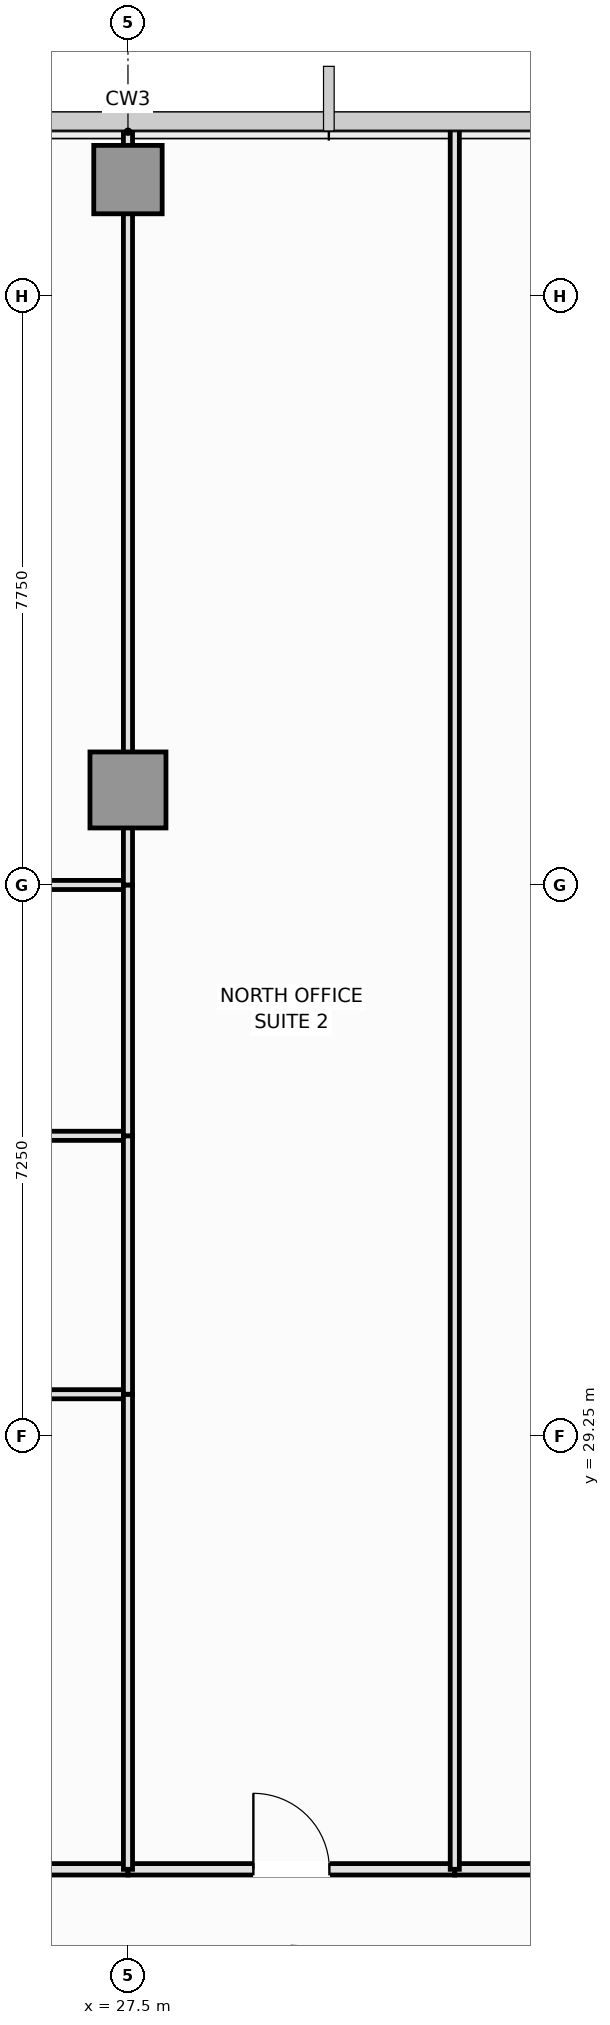
"""IFC4 building model, lengths in metres.
Left out: names, types, materials, properties, quantities, classifications, styles, units other than length and angle.
Written with IfcOpenShell. Run it as: python <this file> out.ifc"""

import sys

from ifc_helpers import new_model, si_unit, direction, frame, frame_2d, origin, origin_2d, place, context, subcontext, project, spatial, rectangle, extrude, element, fill, save


model = new_model("IFC4")
c1 = context("Model", 3, precision=1e-05, world=origin(), true_north=direction((0.0, 1.0)))
c2 = subcontext(c1, "Body", "Model", "MODEL_VIEW")
j1 = project(units=[si_unit("LENGTHUNIT", "METRE"), si_unit("PLANEANGLEUNIT", "RADIAN")], contexts=[c1])
p1 = place(None, origin())
s1 = spatial("IfcSite", under=j1, at=p1, CompositionType="ELEMENT")
p2 = place(p1, origin())
s2 = spatial("IfcBuilding", under=s1, at=p2, CompositionType="ELEMENT")
p3 = place(p2, frame((0.0, 0.0, 127.1)))
s3 = spatial("IfcBuildingStorey", under=s2, at=p3, CompositionType="ELEMENT", Elevation=127.1)
p4 = place(p3, frame((27.5, 37.75, 0.0), z_axis=(0.0, 0.0, 1.0), x_axis=(1.0, 0.0, 0.0)))
e1 = element("IfcColumn", 1, at=p4, inside=s3, PredefinedType="COLUMN", context=c2, shape_type="SweptSolid", body=[
    extrude(rectangle(XDim=1.0, YDim=1.0, at=origin_2d()), origin(), (0.0, 0.0, 1.0), 3.55),
])
p5 = place(p3, frame((27.5, 45.78, 0.0), z_axis=(0.0, 0.0, 1.0), x_axis=(1.0, 0.0, 0.0)))
e2 = element("IfcColumn", 2, at=p5, inside=s3, PredefinedType="COLUMN", context=c2, shape_type="SweptSolid", body=[
    extrude(rectangle(XDim=0.9, YDim=0.9, at=origin_2d()), origin(), (0.0, 0.0, 1.0), 3.55),
])
p6 = place(p3, frame((19.95, 23.55, 0.0), z_axis=(0.0, 0.0, 1.0), x_axis=(1.0, 0.0, 0.0)))
e3 = element("IfcWall", 3, at=p6, inside=s3, PredefinedType="PARTITIONING", context=c2, shape_type="SweptSolid", body=[
    extrude(rectangle(XDim=7.55, YDim=0.15, at=frame_2d((3.775, 0.0))), origin(), (0.0, 0.0, 1.0), 3.37),
])
p7 = place(p3, frame((27.5, 23.55, 0.0), z_axis=(0.0, 0.0, 1.0), x_axis=(1.0, 0.0, 0.0)))
e4 = element("IfcWall", 4, at=p7, inside=s3, PredefinedType="PARTITIONING", context=c2, shape_type="SweptSolid", body=[
    extrude(rectangle(XDim=4.3, YDim=0.15, at=frame_2d((2.15, 0.0))), origin(), (0.0, 0.0, 1.0), 3.37),
])
p8 = place(p7, frame((1.65, 0.0, 0.0)))
e5 = element("IfcOpeningElement", 5, at=p8, cuts=e4, PredefinedType="OPENING", context=c2, shape_type="SweptSolid", body=[
    extrude(rectangle(XDim=1.0, YDim=2.15, at=frame_2d((0.5, 1.075))), frame((0.0, 0.085, 0.0), z_axis=(0.0, -1.0, 0.0), x_axis=(1.0, 0.0, 0.0)), (0.0, 0.0, 1.0), 0.17),
])
p9 = place(p3, frame((31.8, 23.55, 0.0), z_axis=(0.0, 0.0, 1.0), x_axis=(1.0, 0.0, 0.0)))
e6 = element("IfcWall", 6, at=p9, inside=s3, PredefinedType="PARTITIONING", context=c2, shape_type="SweptSolid", body=[
    extrude(rectangle(XDim=4.4, YDim=0.15, at=frame_2d((2.2, 0.0))), origin(), (0.0, 0.0, 1.0), 3.37),
])
p10 = place(p9, frame((1.7, 0.0, 0.0)))
e7 = element("IfcOpeningElement", 7, at=p10, cuts=e6, PredefinedType="OPENING", context=c2, shape_type="SweptSolid", body=[
    extrude(rectangle(XDim=1.0, YDim=2.15, at=frame_2d((0.5, 1.075))), frame((0.0, 0.085, 0.0), z_axis=(0.0, -1.0, 0.0), x_axis=(1.0, 0.0, 0.0)), (0.0, 0.0, 1.0), 0.17),
])
p11 = place(p3, frame((19.95, 29.8, 0.0), z_axis=(0.0, 0.0, 1.0), x_axis=(1.0, 0.0, 0.0)))
e8 = element("IfcWall", 8, at=p11, inside=s3, PredefinedType="PARTITIONING", context=c2, shape_type="SweptSolid", body=[
    extrude(rectangle(XDim=7.55, YDim=0.12, at=frame_2d((3.775, 0.0))), origin(), (0.0, 0.0, 1.0), 3.37),
])
p12 = place(p3, frame((27.5, 23.55, 0.0), z_axis=(0.0, 0.0, 1.0), x_axis=(0.0, 1.0, 0.0)))
e9 = element("IfcWall", 9, at=p12, inside=s3, PredefinedType="PARTITIONING", context=c2, shape_type="SweptSolid", body=[
    extrude(rectangle(XDim=6.25, YDim=0.12, at=frame_2d((3.125, 0.0))), origin(), (0.0, 0.0, 1.0), 3.37),
])
p13 = place(p3, frame((19.95, 33.2, 0.0), z_axis=(0.0, 0.0, 1.0), x_axis=(1.0, 0.0, 0.0)))
e10 = element("IfcWall", 10, at=p13, inside=s3, PredefinedType="PARTITIONING", context=c2, shape_type="SweptSolid", body=[
    extrude(rectangle(XDim=7.55, YDim=0.12, at=frame_2d((3.775, 0.0))), origin(), (0.0, 0.0, 1.0), 3.37),
])
p14 = place(p3, frame((27.5, 29.8, 0.0), z_axis=(0.0, 0.0, 1.0), x_axis=(0.0, 1.0, 0.0)))
e11 = element("IfcWall", 11, at=p14, inside=s3, PredefinedType="PARTITIONING", context=c2, shape_type="SweptSolid", body=[
    extrude(rectangle(XDim=3.4, YDim=0.12, at=frame_2d((1.7, 0.0))), origin(), (0.0, 0.0, 1.0), 3.37),
])
p15 = place(p3, frame((19.95, 36.5, 0.0), z_axis=(0.0, 0.0, 1.0), x_axis=(1.0, 0.0, 0.0)))
e12 = element("IfcWall", 12, at=p15, inside=s3, PredefinedType="PARTITIONING", context=c2, shape_type="SweptSolid", body=[
    extrude(rectangle(XDim=7.55, YDim=0.12, at=frame_2d((3.775, 0.0))), origin(), (0.0, 0.0, 1.0), 3.37),
])
p16 = place(p3, frame((27.5, 33.2, 0.0), z_axis=(0.0, 0.0, 1.0), x_axis=(0.0, 1.0, 0.0)))
e13 = element("IfcWall", 13, at=p16, inside=s3, PredefinedType="PARTITIONING", context=c2, shape_type="SweptSolid", body=[
    extrude(rectangle(XDim=3.3, YDim=0.12, at=frame_2d((1.65, 0.0))), origin(), (0.0, 0.0, 1.0), 3.37),
])
p17 = place(p3, frame((27.5, 36.5, 0.0), z_axis=(0.0, 0.0, 1.0), x_axis=(0.0, 1.0, 0.0)))
e14 = element("IfcWall", 14, at=p17, inside=s3, PredefinedType="PARTITIONING", context=c2, shape_type="SweptSolid", body=[
    extrude(rectangle(XDim=9.99, YDim=0.12, at=frame_2d((4.995, 0.0))), origin(), (0.0, 0.0, 1.0), 2.87),
])
p18 = place(p3, frame((31.8, 23.55, 0.0), z_axis=(0.0, 0.0, 1.0), x_axis=(0.0, 1.0, 0.0)))
e15 = element("IfcWall", 15, at=p18, inside=s3, PredefinedType="PARTITIONING", context=c2, shape_type="SweptSolid", body=[
    extrude(rectangle(XDim=22.94, YDim=0.12, at=frame_2d((11.47, 0.0))), origin(), (0.0, 0.0, 1.0), 3.37),
])
p19 = place(p8, origin())
e16 = element("IfcDoor", 16, at=p19, inside=s3, OperationType="SINGLE_SWING_LEFT", PredefinedType="DOOR", context=c2, shape_type="SweptSolid", body=[
    extrude(rectangle(XDim=1.0, YDim=2.15, at=frame_2d((0.5, 1.075))), frame((0.0, 0.025, 0.0), z_axis=(0.0, -1.0, 0.0), x_axis=(1.0, 0.0, 0.0)), (0.0, 0.0, 1.0), 0.05),
])
fill(e5, e16)
save(model, sys.argv[1])
